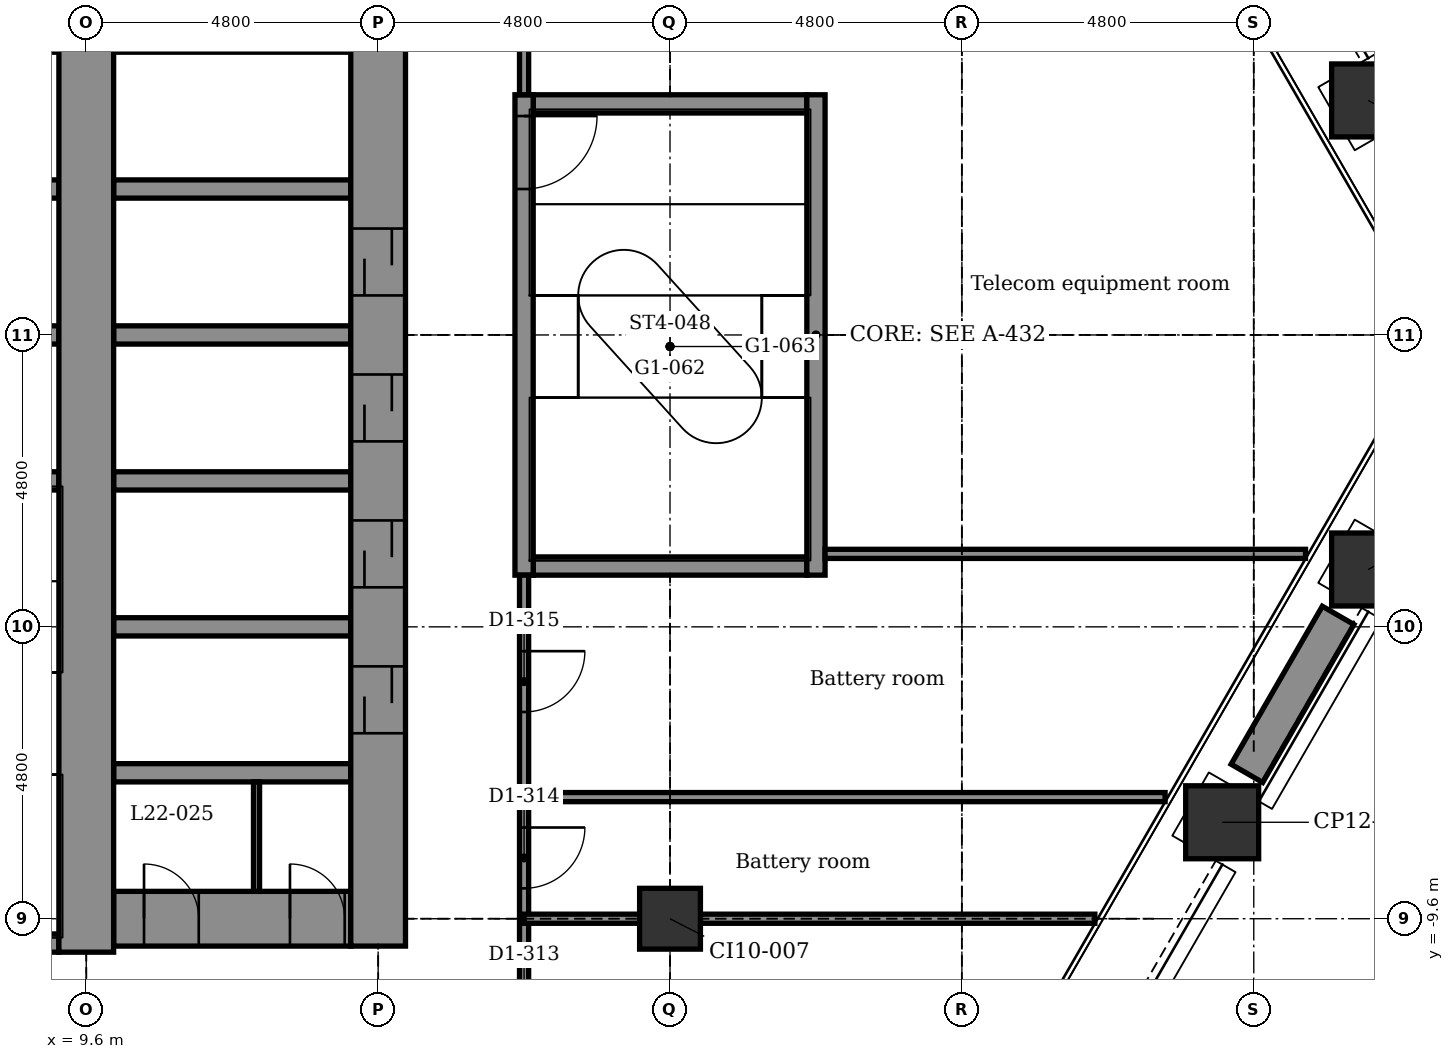
"""IFC4 building model, lengths in metres.
Left out: names, types, materials, properties, quantities, classifications, styles, units other than length and angle.
Written with IfcOpenShell. Run it as: python <this file> out.ifc"""

import sys

from ifc_helpers import new_model, si_unit, direction, frame, frame_2d, origin, origin_2d, place, context, subcontext, project, spatial, rectangle, extrude, element, fill, save


model = new_model("IFC4")
c1 = context("Model", 3, precision=1e-05, world=origin(), true_north=direction((0.0, 1.0)))
c2 = subcontext(c1, "Body", "Model", "MODEL_VIEW")
j1 = project(units=[si_unit("LENGTHUNIT", "METRE"), si_unit("PLANEANGLEUNIT", "RADIAN")], contexts=[c1])
p1 = place(None, origin())
s1 = spatial("IfcSite", under=j1, at=p1, CompositionType="ELEMENT")
p2 = place(p1, origin())
s2 = spatial("IfcBuilding", under=s1, at=p2, CompositionType="ELEMENT")
p3 = place(p2, frame((0.0, 0.0, 113.9)))
s3 = spatial("IfcBuildingStorey", under=s2, at=p3, CompositionType="ELEMENT", Elevation=113.9)
for number, where, z_axis, x_axis in (
    (1, (30.68, 3.857, -0.2), (0.0, 0.0, 1.0), (0.866, 0.5, 0.0)),
    (2, (30.68, -3.857, -0.2), (0.0, 0.0, 1.0), (0.5, 0.866, 0.0)),
    (3, (28.28, -8.014, -0.2), (0.0, 0.0, 1.0), (0.5, 0.866, 0.0)),
):
    element("IfcColumn", number, at=place(p3, frame(where, z_axis=z_axis, x_axis=x_axis)), inside=s3, PredefinedType="COLUMN", context=c2, shape_type="SweptSolid", body=[
        extrude(rectangle(XDim=1.2, YDim=1.2, at=origin_2d()), origin(), (0.0, 0.0, 1.0), 4.5),
    ])
p4 = place(p3, frame((19.2, -9.6, -0.2), z_axis=(0.0, 0.0, 1.0), x_axis=(1.0, 0.0, 0.0)))
e4 = element("IfcColumn", 4, at=p4, inside=s3, PredefinedType="COLUMN", context=c2, shape_type="SweptSolid", body=[
    extrude(rectangle(XDim=1.0, YDim=1.0, at=origin_2d()), origin(), (0.0, 0.0, 1.0), 4.5),
])
p5 = place(p3, frame((4.95, -10.0, -0.2), z_axis=(0.0, 0.0, 1.0), x_axis=(1.0, 0.0, 0.0)))
e5 = element("IfcWall", 5, at=p5, inside=s3, PredefinedType="STANDARD", context=c2, shape_type="SweptSolid", body=[
    extrude(rectangle(XDim=4.2, YDim=0.3, at=frame_2d((2.1, 0.0))), origin(), (0.0, 0.0, 1.0), 4.5),
])
p6 = place(p3, frame((10.05, -9.6, -0.2), z_axis=(0.0, 0.0, 1.0), x_axis=(1.0, 0.0, 0.0)))
e6 = element("IfcWall", 6, at=p6, inside=s3, PredefinedType="SHEAR", context=c2, shape_type="SweptSolid", body=[
    extrude(rectangle(XDim=3.9, YDim=0.9, at=frame_2d((1.95, 0.0))), origin(), (0.0, 0.0, 1.0), 4.5),
])
p7 = place(p6, frame((0.5, 0.0, 0.2)))
e7 = element("IfcOpeningElement", 7, at=p7, cuts=e6, PredefinedType="OPENING", context=c2, shape_type="SweptSolid", body=[
    extrude(rectangle(XDim=0.9, YDim=2.1, at=frame_2d((0.45, 1.05))), frame((0.0, 0.46, 0.0), z_axis=(0.0, -1.0, 0.0), x_axis=(1.0, 0.0, 0.0)), (0.0, 0.0, 1.0), 0.92),
])
p8 = place(p6, frame((2.9, 0.0, 0.2)))
e8 = element("IfcOpeningElement", 8, at=p8, cuts=e6, PredefinedType="OPENING", context=c2, shape_type="SweptSolid", body=[
    extrude(rectangle(XDim=0.9, YDim=2.1, at=frame_2d((0.45, 1.05))), frame((0.0, 0.46, 0.0), z_axis=(0.0, -1.0, 0.0), x_axis=(1.0, 0.0, 0.0)), (0.0, 0.0, 1.0), 0.92),
])
for number, where, z_axis, x_axis in (
    (9, (10.05, -7.2, -0.2), (0.0, 0.0, 1.0), (1.0, 0.0, 0.0)),
    (10, (10.05, -4.8, -0.2), (0.0, 0.0, 1.0), (1.0, 0.0, 0.0)),
):
    element("IfcWall", number, at=place(p3, frame(where, z_axis=z_axis, x_axis=x_axis)), inside=s3, PredefinedType="STANDARD", context=c2, shape_type="SweptSolid", body=[
        extrude(rectangle(XDim=3.9, YDim=0.3, at=frame_2d((1.95, 0.0))), origin(), (0.0, 0.0, 1.0), 4.5),
    ])
p9 = place(p3, frame((16.95, -3.8, -0.2), z_axis=(0.0, 0.0, 1.0), x_axis=(1.0, 0.0, 0.0)))
e11 = element("IfcWall", 11, at=p9, inside=s3, PredefinedType="STANDARD", context=c2, shape_type="SweptSolid", body=[
    extrude(rectangle(XDim=4.5, YDim=0.3, at=frame_2d((2.25, 0.0))), origin(), (0.0, 0.0, 1.0), 4.5),
])
p10 = place(p3, frame((6.15, -2.4, -0.2), z_axis=(0.0, 0.0, 1.0), x_axis=(1.0, 0.0, 0.0)))
e12 = element("IfcWall", 12, at=p10, inside=s3, PredefinedType="STANDARD", context=c2, shape_type="SweptSolid", body=[
    extrude(rectangle(XDim=3.0, YDim=0.3, at=frame_2d((1.5, 0.0))), origin(), (0.0, 0.0, 1.0), 4.5),
])
p11 = place(p3, frame((10.05, -2.4, -0.2), z_axis=(0.0, 0.0, 1.0), x_axis=(1.0, 0.0, 0.0)))
e13 = element("IfcWall", 13, at=p11, inside=s3, PredefinedType="STANDARD", context=c2, shape_type="SweptSolid", body=[
    extrude(rectangle(XDim=3.9, YDim=0.3, at=frame_2d((1.95, 0.0))), origin(), (0.0, 0.0, 1.0), 4.5),
])
p12 = place(p3, frame((6.15, 0.0, -0.2), z_axis=(0.0, 0.0, 1.0), x_axis=(1.0, 0.0, 0.0)))
e14 = element("IfcWall", 14, at=p12, inside=s3, PredefinedType="STANDARD", context=c2, shape_type="SweptSolid", body=[
    extrude(rectangle(XDim=3.0, YDim=0.3, at=frame_2d((1.5, 0.0))), origin(), (0.0, 0.0, 1.0), 4.5),
])
p13 = place(p3, frame((10.05, 0.0, -0.2), z_axis=(0.0, 0.0, 1.0), x_axis=(1.0, 0.0, 0.0)))
e15 = element("IfcWall", 15, at=p13, inside=s3, PredefinedType="STANDARD", context=c2, shape_type="SweptSolid", body=[
    extrude(rectangle(XDim=3.9, YDim=0.3, at=frame_2d((1.95, 0.0))), origin(), (0.0, 0.0, 1.0), 4.5),
])
p14 = place(p3, frame((6.15, 2.4, -0.2), z_axis=(0.0, 0.0, 1.0), x_axis=(1.0, 0.0, 0.0)))
e16 = element("IfcWall", 16, at=p14, inside=s3, PredefinedType="STANDARD", context=c2, shape_type="SweptSolid", body=[
    extrude(rectangle(XDim=3.0, YDim=0.3, at=frame_2d((1.5, 0.0))), origin(), (0.0, 0.0, 1.0), 4.5),
])
p15 = place(p3, frame((10.05, 2.4, -0.2), z_axis=(0.0, 0.0, 1.0), x_axis=(1.0, 0.0, 0.0)))
e17 = element("IfcWall", 17, at=p15, inside=s3, PredefinedType="STANDARD", context=c2, shape_type="SweptSolid", body=[
    extrude(rectangle(XDim=3.9, YDim=0.3, at=frame_2d((1.95, 0.0))), origin(), (0.0, 0.0, 1.0), 4.5),
])
p16 = place(p3, frame((16.95, 3.8, -0.2), z_axis=(0.0, 0.0, 1.0), x_axis=(1.0, 0.0, 0.0)))
e18 = element("IfcWall", 18, at=p16, inside=s3, PredefinedType="STANDARD", context=c2, shape_type="SweptSolid", body=[
    extrude(rectangle(XDim=4.5, YDim=0.3, at=frame_2d((2.25, 0.0))), origin(), (0.0, 0.0, 1.0), 4.5),
])
p17 = place(p3, frame((9.6, -10.15, -0.2), z_axis=(0.0, 0.0, 1.0), x_axis=(0.0, 1.0, 0.0)))
e19 = element("IfcWall", 19, at=p17, inside=s3, PredefinedType="SHEAR", context=c2, shape_type="SweptSolid", body=[
    extrude(rectangle(XDim=20.2, YDim=0.9, at=frame_2d((10.1, 0.0))), origin(), (0.0, 0.0, 1.0), 4.5),
])
p18 = place(p3, frame((14.4, -10.05, -0.2), z_axis=(0.0, 0.0, 1.0), x_axis=(0.0, 1.0, 0.0)))
e20 = element("IfcWall", 20, at=p18, inside=s3, PredefinedType="SHEAR", context=c2, shape_type="SweptSolid", body=[
    extrude(rectangle(XDim=20.1, YDim=0.9, at=frame_2d((10.05, 0.0))), origin(), (0.0, 0.0, 1.0), 4.5),
])
p19 = place(p18, frame((3.5, 0.0, 0.2)))
e21 = element("IfcOpeningElement", 21, at=p19, cuts=e20, PredefinedType="OPENING", context=c2, shape_type="SweptSolid", body=[
    extrude(rectangle(XDim=1.1, YDim=2.1, at=frame_2d((0.55, 1.05))), frame((0.0, 0.46, 0.0), z_axis=(0.0, -1.0, 0.0), x_axis=(1.0, 0.0, 0.0)), (0.0, 0.0, 1.0), 0.92),
])
p20 = place(p18, frame((5.9, 0.0, 0.2)))
e22 = element("IfcOpeningElement", 22, at=p20, cuts=e20, PredefinedType="OPENING", context=c2, shape_type="SweptSolid", body=[
    extrude(rectangle(XDim=1.1, YDim=2.1, at=frame_2d((0.55, 1.05))), frame((0.0, 0.46, 0.0), z_axis=(0.0, -1.0, 0.0), x_axis=(1.0, 0.0, 0.0)), (0.0, 0.0, 1.0), 0.92),
])
p21 = place(p18, frame((8.3, 0.0, 0.2)))
e23 = element("IfcOpeningElement", 23, at=p21, cuts=e20, PredefinedType="OPENING", context=c2, shape_type="SweptSolid", body=[
    extrude(rectangle(XDim=1.1, YDim=2.1, at=frame_2d((0.55, 1.05))), frame((0.0, 0.46, 0.0), z_axis=(0.0, -1.0, 0.0), x_axis=(1.0, 0.0, 0.0)), (0.0, 0.0, 1.0), 0.92),
])
p22 = place(p18, frame((10.7, 0.0, 0.2)))
e24 = element("IfcOpeningElement", 24, at=p22, cuts=e20, PredefinedType="OPENING", context=c2, shape_type="SweptSolid", body=[
    extrude(rectangle(XDim=1.1, YDim=2.1, at=frame_2d((0.55, 1.05))), frame((0.0, 0.46, 0.0), z_axis=(0.0, -1.0, 0.0), x_axis=(1.0, 0.0, 0.0)), (0.0, 0.0, 1.0), 0.92),
])
p23 = place(p3, frame((16.8, -3.95, -0.2), z_axis=(0.0, 0.0, 1.0), x_axis=(0.0, 1.0, 0.0)))
e25 = element("IfcWall", 25, at=p23, inside=s3, PredefinedType="STANDARD", context=c2, shape_type="SweptSolid", body=[
    extrude(rectangle(XDim=7.9, YDim=0.3, at=frame_2d((3.95, 0.0))), origin(), (0.0, 0.0, 1.0), 4.5),
])
p24 = place(p23, frame((6.35, 0.0, 0.2)))
e26 = element("IfcOpeningElement", 26, at=p24, cuts=e25, PredefinedType="OPENING", context=c2, shape_type="SweptSolid", body=[
    extrude(rectangle(XDim=1.2, YDim=2.1, at=frame_2d((0.6, 1.05))), frame((0.0, 0.16, 0.0), z_axis=(0.0, -1.0, 0.0), x_axis=(1.0, 0.0, 0.0)), (0.0, 0.0, 1.0), 0.32),
])
p25 = place(p3, frame((21.6, -3.95, -0.2), z_axis=(0.0, 0.0, 1.0), x_axis=(0.0, 1.0, 0.0)))
e27 = element("IfcWall", 27, at=p25, inside=s3, PredefinedType="STANDARD", context=c2, shape_type="SweptSolid", body=[
    extrude(rectangle(XDim=7.9, YDim=0.3, at=frame_2d((3.95, 0.0))), origin(), (0.0, 0.0, 1.0), 4.5),
])
p26 = place(p3, frame((30.187, -4.611, 0.0), z_axis=(0.0, 0.0, 1.0), x_axis=(-0.499990139034, -0.866031096941, 0.0)))
e28 = element("IfcWall", 28, at=p26, inside=s3, PredefinedType="USERDEFINED", context=c2, shape_type="SweptSolid", body=[
    extrude(rectangle(XDim=3.0, YDim=0.6, at=frame_2d((1.5, 0.0))), origin(), (0.0, 0.0, 1.0), 0.7),
])
p27 = place(p3, frame((16.8, -25.858, 0.0), z_axis=(0.0, 0.0, 1.0), x_axis=(0.0, 1.0, 0.0)))
e29 = element("IfcWall", 29, at=p27, inside=s3, PredefinedType="PARTITIONING", context=c2, shape_type="SweptSolid", body=[
    extrude(rectangle(XDim=21.908, YDim=0.15, at=frame_2d((10.954, 0.0))), origin(), (0.0, 0.0, 1.0), 4.3),
])
p28 = place(p27, frame((14.158, 0.0, 0.0)))
e30 = element("IfcOpeningElement", 30, at=p28, cuts=e29, PredefinedType="OPENING", context=c2, shape_type="SweptSolid", body=[
    extrude(rectangle(XDim=1.0, YDim=2.1, at=frame_2d((0.5, 1.05))), frame((0.0, 0.085, 0.0), z_axis=(0.0, -1.0, 0.0), x_axis=(1.0, 0.0, 0.0)), (0.0, 0.0, 1.0), 0.17),
])
p29 = place(p27, frame((16.759, 0.0, 0.0)))
e31 = element("IfcOpeningElement", 31, at=p29, cuts=e29, PredefinedType="OPENING", context=c2, shape_type="SweptSolid", body=[
    extrude(rectangle(XDim=1.0, YDim=2.1, at=frame_2d((0.5, 1.05))), frame((0.0, 0.085, 0.0), z_axis=(0.0, -1.0, 0.0), x_axis=(1.0, 0.0, 0.0)), (0.0, 0.0, 1.0), 0.17),
])
p30 = place(p27, frame((19.658, 0.0, 0.0)))
e32 = element("IfcOpeningElement", 32, at=p30, cuts=e29, PredefinedType="OPENING", context=c2, shape_type="SweptSolid", body=[
    extrude(rectangle(XDim=1.0, YDim=2.1, at=frame_2d((0.5, 1.05))), frame((0.0, 0.085, 0.0), z_axis=(0.0, -1.0, 0.0), x_axis=(1.0, 0.0, 0.0)), (0.0, 0.0, 1.0), 0.17),
])
p31 = place(p3, frame((16.8, 3.95, 0.0), z_axis=(0.0, 0.0, 1.0), x_axis=(0.0, 1.0, 0.0)))
e33 = element("IfcWall", 33, at=p31, inside=s3, PredefinedType="PARTITIONING", context=c2, shape_type="SweptSolid", body=[
    extrude(rectangle(XDim=21.908, YDim=0.15, at=frame_2d((10.954, 0.0))), origin(), (0.0, 0.0, 1.0), 4.3),
])
p32 = place(p31, frame((0.95, 0.0, 0.0)))
e34 = element("IfcOpeningElement", 34, at=p32, cuts=e33, PredefinedType="OPENING", context=c2, shape_type="SweptSolid", body=[
    extrude(rectangle(XDim=1.0, YDim=2.1, at=frame_2d((0.5, 1.05))), frame((0.0, 0.085, 0.0), z_axis=(0.0, -1.0, 0.0), x_axis=(1.0, 0.0, 0.0)), (0.0, 0.0, 1.0), 0.17),
])
p33 = place(p31, frame((3.675, 0.0, 0.0)))
e35 = element("IfcOpeningElement", 35, at=p33, cuts=e33, PredefinedType="OPENING", context=c2, shape_type="SweptSolid", body=[
    extrude(rectangle(XDim=1.0, YDim=2.1, at=frame_2d((0.5, 1.05))), frame((0.0, 0.085, 0.0), z_axis=(0.0, -1.0, 0.0), x_axis=(1.0, 0.0, 0.0)), (0.0, 0.0, 1.0), 0.17),
])
p34 = place(p31, frame((7.35, 0.0, 0.0)))
e36 = element("IfcOpeningElement", 36, at=p34, cuts=e33, PredefinedType="OPENING", context=c2, shape_type="SweptSolid", body=[
    extrude(rectangle(XDim=1.0, YDim=2.1, at=frame_2d((0.5, 1.05))), frame((0.0, 0.085, 0.0), z_axis=(0.0, -1.0, 0.0), x_axis=(1.0, 0.0, 0.0)), (0.0, 0.0, 1.0), 0.17),
])
p35 = place(p3, frame((12.4, -9.15, 0.0), z_axis=(0.0, 0.0, 1.0), x_axis=(0.0, 1.0, 0.0)))
e37 = element("IfcWall", 37, at=p35, inside=s3, PredefinedType="PARTITIONING", context=c2, shape_type="SweptSolid", body=[
    extrude(rectangle(XDim=1.8, YDim=0.1, at=frame_2d((0.9, 0.0))), origin(), (0.0, 0.0, 1.0), 4.3),
])
p36 = place(p3, frame((16.8, -9.6, 0.0), z_axis=(0.0, 0.0, 1.0), x_axis=(1.0, 0.0, 0.0)))
e38 = element("IfcWall", 38, at=p36, inside=s3, PredefinedType="PARTITIONING", context=c2, shape_type="SweptSolid", body=[
    extrude(rectangle(XDim=1.9, YDim=0.15, at=frame_2d((0.95, 0.0))), origin(), (0.0, 0.0, 1.0), 3.692),
])
p37 = place(p3, frame((19.7, -9.6, 0.0), z_axis=(0.0, 0.0, 1.0), x_axis=(1.0, 0.0, 0.0)))
e39 = element("IfcWall", 39, at=p37, inside=s3, PredefinedType="PARTITIONING", context=c2, shape_type="SweptSolid", body=[
    extrude(rectangle(XDim=6.487, YDim=0.15, at=frame_2d((3.243, 0.0))), origin(), (0.0, 0.0, 1.0), 3.692),
])
p38 = place(p3, frame((16.8, -7.6, 0.0), z_axis=(0.0, 0.0, 1.0), x_axis=(1.0, 0.0, 0.0)))
e40 = element("IfcWall", 40, at=p38, inside=s3, PredefinedType="PARTITIONING", context=c2, shape_type="SweptSolid", body=[
    extrude(rectangle(XDim=10.542, YDim=0.15, at=frame_2d((5.271, 0.0))), origin(), (0.0, 0.0, 1.0), 4.3),
])
p39 = place(p3, frame((21.75, -3.6, 0.0), z_axis=(0.0, 0.0, 1.0), x_axis=(1.0, 0.0, 0.0)))
e41 = element("IfcWall", 41, at=p39, inside=s3, PredefinedType="PARTITIONING", context=c2, shape_type="SweptSolid", body=[
    extrude(rectangle(XDim=7.901, YDim=0.15, at=frame_2d((3.95, 0.0))), origin(), (0.0, 0.0, 1.0), 4.3),
])
p40 = place(p29, frame((1.0, 0.0, 0.0), z_axis=(0.0, 0.0, 1.0), x_axis=(-1.0, 0.0, 0.0)))
e42 = element("IfcDoor", 42, at=p40, inside=s3, OperationType="SINGLE_SWING_RIGHT", PredefinedType="DOOR", context=c2, shape_type="SweptSolid", body=[
    extrude(rectangle(XDim=1.0, YDim=2.1, at=frame_2d((0.5, 1.05))), frame((0.0, 0.025, 0.0), z_axis=(0.0, -1.0, 0.0), x_axis=(1.0, 0.0, 0.0)), (0.0, 0.0, 1.0), 0.05),
])
fill(e31, e42)
p41 = place(p30, frame((1.0, 0.0, 0.0), z_axis=(0.0, 0.0, 1.0), x_axis=(-1.0, 0.0, 0.0)))
e43 = element("IfcDoor", 43, at=p41, inside=s3, OperationType="SINGLE_SWING_RIGHT", PredefinedType="DOOR", context=c2, shape_type="SweptSolid", body=[
    extrude(rectangle(XDim=1.0, YDim=2.1, at=frame_2d((0.5, 1.05))), frame((0.0, 0.025, 0.0), z_axis=(0.0, -1.0, 0.0), x_axis=(1.0, 0.0, 0.0)), (0.0, 0.0, 1.0), 0.05),
])
fill(e32, e43)
p42 = place(p19, origin())
e44 = element("IfcDoor", 44, at=p42, inside=s3, OperationType="DOUBLE_DOOR_SLIDING", PredefinedType="DOOR", context=c2, shape_type="SweptSolid", body=[
    extrude(rectangle(XDim=1.1, YDim=2.1, at=frame_2d((0.55, 1.05))), frame((0.0, 0.025, 0.0), z_axis=(0.0, -1.0, 0.0), x_axis=(1.0, 0.0, 0.0)), (0.0, 0.0, 1.0), 0.05),
])
fill(e21, e44)
p43 = place(p20, origin())
e45 = element("IfcDoor", 45, at=p43, inside=s3, OperationType="DOUBLE_DOOR_SLIDING", PredefinedType="DOOR", context=c2, shape_type="SweptSolid", body=[
    extrude(rectangle(XDim=1.1, YDim=2.1, at=frame_2d((0.55, 1.05))), frame((0.0, 0.025, 0.0), z_axis=(0.0, -1.0, 0.0), x_axis=(1.0, 0.0, 0.0)), (0.0, 0.0, 1.0), 0.05),
])
fill(e22, e45)
p44 = place(p21, origin())
e46 = element("IfcDoor", 46, at=p44, inside=s3, OperationType="DOUBLE_DOOR_SLIDING", PredefinedType="DOOR", context=c2, shape_type="SweptSolid", body=[
    extrude(rectangle(XDim=1.1, YDim=2.1, at=frame_2d((0.55, 1.05))), frame((0.0, 0.025, 0.0), z_axis=(0.0, -1.0, 0.0), x_axis=(1.0, 0.0, 0.0)), (0.0, 0.0, 1.0), 0.05),
])
fill(e23, e46)
p45 = place(p22, origin())
e47 = element("IfcDoor", 47, at=p45, inside=s3, OperationType="DOUBLE_DOOR_SLIDING", PredefinedType="DOOR", context=c2, shape_type="SweptSolid", body=[
    extrude(rectangle(XDim=1.1, YDim=2.1, at=frame_2d((0.55, 1.05))), frame((0.0, 0.025, 0.0), z_axis=(0.0, -1.0, 0.0), x_axis=(1.0, 0.0, 0.0)), (0.0, 0.0, 1.0), 0.05),
])
fill(e24, e47)
p46 = place(p24, frame((1.2, 0.0, 0.0), z_axis=(0.0, 0.0, 1.0), x_axis=(-1.0, 0.0, 0.0)))
e48 = element("IfcDoor", 48, at=p46, inside=s3, OperationType="SINGLE_SWING_RIGHT", PredefinedType="DOOR", context=c2, shape_type="SweptSolid", body=[
    extrude(rectangle(XDim=1.2, YDim=2.1, at=frame_2d((0.6, 1.05))), frame((0.0, 0.025, 0.0), z_axis=(0.0, -1.0, 0.0), x_axis=(1.0, 0.0, 0.0)), (0.0, 0.0, 1.0), 0.05),
])
fill(e26, e48)
p47 = place(p7, origin())
e49 = element("IfcDoor", 49, at=p47, inside=s3, OperationType="SINGLE_SWING_LEFT", PredefinedType="DOOR", context=c2, shape_type="SweptSolid", body=[
    extrude(rectangle(XDim=0.9, YDim=2.1, at=frame_2d((0.45, 1.05))), frame((0.0, 0.025, 0.0), z_axis=(0.0, -1.0, 0.0), x_axis=(1.0, 0.0, 0.0)), (0.0, 0.0, 1.0), 0.05),
])
fill(e7, e49)
p48 = place(p8, origin())
e50 = element("IfcDoor", 50, at=p48, inside=s3, OperationType="SINGLE_SWING_LEFT", PredefinedType="DOOR", context=c2, shape_type="SweptSolid", body=[
    extrude(rectangle(XDim=0.9, YDim=2.1, at=frame_2d((0.45, 1.05))), frame((0.0, 0.025, 0.0), z_axis=(0.0, -1.0, 0.0), x_axis=(1.0, 0.0, 0.0)), (0.0, 0.0, 1.0), 0.05),
])
fill(e8, e50)
save(model, sys.argv[1])
